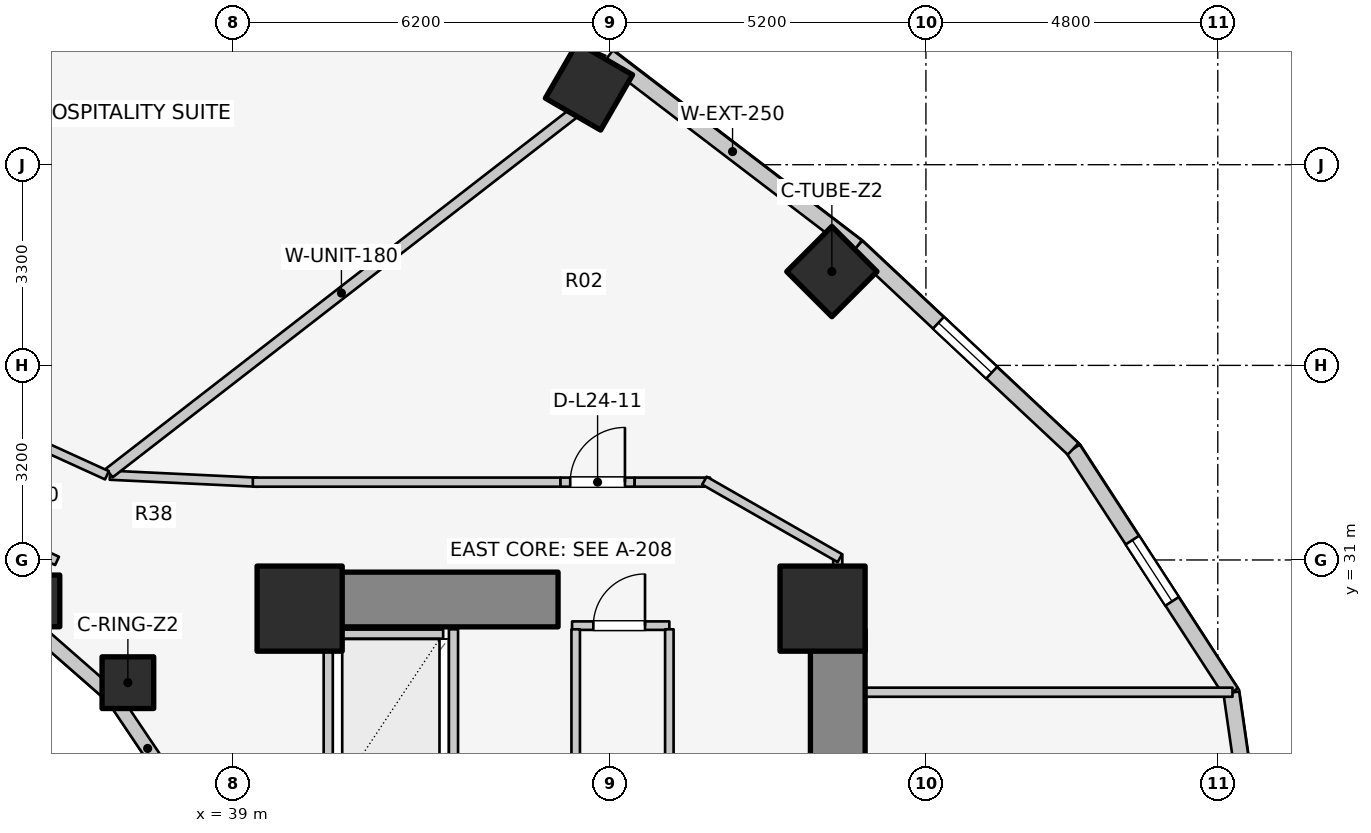
"""IFC4 building model, lengths in metres.
Left out: names, types, materials, properties, quantities, classifications, styles, units other than length and angle.
Written with IfcOpenShell. Run it as: python <this file> out.ifc"""

import sys

from ifc_helpers import new_model, si_unit, direction, frame, frame_2d, origin, origin_2d, place, context, subcontext, project, spatial, rectangle, extrude, element, fill, save


model = new_model("IFC4")
c1 = context("Model", 3, precision=1e-05, world=origin(), true_north=direction((0.0, 1.0)))
c2 = subcontext(c1, "Body", "Model", "MODEL_VIEW")
j1 = project(units=[si_unit("LENGTHUNIT", "METRE"), si_unit("PLANEANGLEUNIT", "RADIAN")], contexts=[c1])
p1 = place(None, origin())
s1 = spatial("IfcSite", under=j1, at=p1, CompositionType="ELEMENT")
p2 = place(p1, origin())
s2 = spatial("IfcBuilding", under=s1, at=p2, CompositionType="ELEMENT")
p3 = place(p2, frame((0.0, 0.0, 82.5)))
s3 = spatial("IfcBuildingStorey", under=s2, at=p3, CompositionType="ELEMENT", Elevation=82.5)
p4 = place(p3, frame((48.95, 17.05, 0.0), z_axis=(0.0, 0.0, 1.0), x_axis=(0.0, 1.0, 0.0)))
e1 = element("IfcWall", 1, at=p4, inside=s3, PredefinedType="SHEAR", context=c2, shape_type="SweptSolid", body=[
    extrude(rectangle(XDim=12.8, YDim=0.9, at=frame_2d((6.4, 0.0))), origin(), (0.0, 0.0, 1.0), 3.1),
])
p5 = place(p3, frame((39.85, 30.35, 0.0), z_axis=(0.0, 0.0, 1.0), x_axis=(1.0, 0.0, 0.0)))
e2 = element("IfcWall", 2, at=p5, inside=s3, PredefinedType="SHEAR", context=c2, shape_type="SweptSolid", body=[
    extrude(rectangle(XDim=4.5, YDim=0.9, at=frame_2d((2.25, 0.0))), origin(), (0.0, 0.0, 1.0), 3.1),
])
for number, where, z_axis, x_axis in (
    (3, (48.7, 30.2, 0.0), (0.0, 0.0, 1.0), (1.0, 0.0, 0.0)),
    (4, (40.1, 30.2, 0.0), (0.0, 0.0, 1.0), (1.0, 0.0, 0.0)),
):
    element("IfcColumn", number, at=place(p3, frame(where, z_axis=z_axis, x_axis=x_axis)), inside=s3, PredefinedType="COLUMN", context=c2, shape_type="SweptSolid", body=[
        extrude(rectangle(XDim=1.4, YDim=1.4, at=origin_2d()), origin(), (0.0, 0.0, 1.0), 3.1),
    ])
p6 = place(p3, frame((37.275, 28.982, 0.0), z_axis=(0.0, 0.0, 1.0), x_axis=(1.0, 0.0, 0.0)))
e5 = element("IfcColumn", 5, at=p6, inside=s3, PredefinedType="COLUMN", context=c2, shape_type="SweptSolid", body=[
    extrude(rectangle(XDim=0.85, YDim=0.85, at=origin_2d()), origin(), (0.0, 0.0, 1.0), 3.1),
])
p7 = place(p3, frame((48.853, 35.743, 0.0), z_axis=(0.0, 0.0, 1.0), x_axis=(0.707106781187, 0.707106781187, 0.0)))
e6 = element("IfcColumn", 6, at=p7, inside=s3, PredefinedType="COLUMN", context=c2, shape_type="SweptSolid", body=[
    extrude(rectangle(XDim=1.05, YDim=1.05, at=origin_2d()), origin(), (0.0, 0.0, 1.0), 3.1),
])
p8 = place(p3, frame((35.73, 30.327, 0.0), z_axis=(0.0, 0.0, 1.0), x_axis=(1.0, 0.0, 0.0)))
e7 = element("IfcColumn", 7, at=p8, inside=s3, PredefinedType="COLUMN", context=c2, shape_type="SweptSolid", body=[
    extrude(rectangle(XDim=0.85, YDim=0.85, at=origin_2d()), origin(), (0.0, 0.0, 1.0), 3.1),
])
p9 = place(p3, frame((44.858, 38.786, 0.0), z_axis=(0.0, 0.0, 1.0), x_axis=(0.5, 0.866025403784, 0.0)))
e8 = element("IfcColumn", 8, at=p9, inside=s3, PredefinedType="COLUMN", context=c2, shape_type="SweptSolid", body=[
    extrude(rectangle(XDim=1.05, YDim=1.05, at=origin_2d()), origin(), (0.0, 0.0, 1.0), 3.1),
])
p10 = place(p3, frame((38.166, 27.06, 0.0), z_axis=(0.0, 0.0, 1.0), x_axis=(-0.558197800898, 0.829707909492, 0.0)))
e9 = element("IfcWall", 9, at=p10, inside=s3, PredefinedType="STANDARD", context=c2, shape_type="SweptSolid", body=[
    extrude(rectangle(XDim=2.027, YDim=0.23, at=frame_2d((1.013, 0.0))), origin(), (0.0, 0.0, 1.0), 1.22),
])
p11 = place(p3, frame((37.035, 28.742, 0.0), z_axis=(0.0, 0.0, 1.0), x_axis=(-0.752576694707, 0.658504607869, 0.0)))
e10 = element("IfcWall", 10, at=p11, inside=s3, PredefinedType="STANDARD", context=c2, shape_type="SweptSolid", body=[
    extrude(rectangle(XDim=1.959, YDim=0.23, at=frame_2d((0.98, 0.0))), origin(), (0.0, 0.0, 1.0), 1.22),
])
p12 = place(p3, frame((56.26, 23.0, 0.0), z_axis=(0.0, 0.0, 1.0), x_axis=(-0.142572472068, 0.98978436551, 0.0)))
e11 = element("IfcWall", 11, at=p12, inside=s3, PredefinedType="STANDARD", context=c2, shape_type="SweptSolid", body=[
    extrude(rectangle(XDim=5.879, YDim=0.26, at=frame_2d((2.939, 0.0))), origin(), (0.0, 0.0, 1.0), 2.57),
])
p13 = place(p12, frame((2.921, 0.0, 0.75)))
e12 = element("IfcOpeningElement", 12, at=p13, cuts=e11, PredefinedType="OPENING", context=c2, shape_type="SweptSolid", body=[
    extrude(rectangle(XDim=1.2, YDim=1.5, at=frame_2d((0.6, 0.75))), frame((0.0, 0.14, 0.0), z_axis=(0.0, -1.0, 0.0), x_axis=(1.0, 0.0, 0.0)), (0.0, 0.0, 1.0), 0.28),
])
p14 = place(p3, frame((55.422, 28.819, 0.0), z_axis=(0.0, 0.0, 1.0), x_axis=(-0.544388392991, 0.838833283541, 0.0)))
e13 = element("IfcWall", 13, at=p14, inside=s3, PredefinedType="STANDARD", context=c2, shape_type="SweptSolid", body=[
    extrude(rectangle(XDim=4.778, YDim=0.26, at=frame_2d((2.389, 0.0))), origin(), (0.0, 0.0, 1.0), 1.22),
])
p15 = place(p14, frame((1.789, 0.0, 0.15)))
e14 = element("IfcOpeningElement", 14, at=p15, cuts=e13, PredefinedType="OPENING", context=c2, shape_type="SweptSolid", body=[
    extrude(rectangle(XDim=1.2, YDim=0.9, at=frame_2d((0.6, 0.45))), frame((0.0, 0.14, 0.0), z_axis=(0.0, -1.0, 0.0), x_axis=(1.0, 0.0, 0.0)), (0.0, 0.0, 1.0), 0.28),
])
p16 = place(p3, frame((52.821, 32.827, 0.0), z_axis=(0.0, 0.0, 1.0), x_axis=(-0.730162452258, 0.68327358599, 0.0)))
e15 = element("IfcWall", 15, at=p16, inside=s3, PredefinedType="STANDARD", context=c2, shape_type="SweptSolid", body=[
    extrude(rectangle(XDim=4.868, YDim=0.26, at=frame_2d((2.434, 0.0))), origin(), (0.0, 0.0, 1.0), 1.22),
])
p17 = place(p16, frame((1.834, 0.0, 0.15)))
e16 = element("IfcOpeningElement", 16, at=p17, cuts=e15, PredefinedType="OPENING", context=c2, shape_type="SweptSolid", body=[
    extrude(rectangle(XDim=1.2, YDim=0.9, at=frame_2d((0.6, 0.45))), frame((0.0, 0.14, 0.0), z_axis=(0.0, -1.0, 0.0), x_axis=(1.0, 0.0, 0.0)), (0.0, 0.0, 1.0), 0.28),
])
p18 = place(p3, frame((49.266, 36.153, 0.0), z_axis=(0.0, 0.0, 1.0), x_axis=(-0.794809810864, 0.606858603427, 0.0)))
e17 = element("IfcWall", 17, at=p18, inside=s3, PredefinedType="STANDARD", context=c2, shape_type="SweptSolid", body=[
    extrude(rectangle(XDim=5.149, YDim=0.26, at=frame_2d((2.575, 0.0))), origin(), (0.0, 0.0, 1.0), 1.22),
])
p19 = place(p3, frame((40.74, 29.78, 0.0), z_axis=(0.0, 0.0, 1.0), x_axis=(1.0, 0.0, 0.0)))
e18 = element("IfcWall", 18, at=p19, inside=s3, PredefinedType="SOLIDWALL", context=c2, shape_type="SweptSolid", body=[
    extrude(rectangle(XDim=1.72, YDim=0.15, at=frame_2d((0.86, 0.0))), origin(), (0.0, 0.0, 1.0), 2.575),
])
for number, where, z_axis, x_axis in (
    (19, (40.57, 27.14, 0.0), (0.0, 0.0, 1.0), (0.0, 1.0, 0.0)),
    (20, (42.63, 27.14, 0.0), (0.0, 0.0, 1.0), (0.0, 1.0, 0.0)),
):
    element("IfcWall", number, at=place(p3, frame(where, z_axis=z_axis, x_axis=x_axis)), inside=s3, PredefinedType="SOLIDWALL", context=c2, shape_type="SweptSolid", body=[
        extrude(rectangle(XDim=2.72, YDim=0.15, at=frame_2d((1.36, 0.0))), origin(), (0.0, 0.0, 1.0), 2.575),
    ])
p20 = place(p3, frame((44.58, 29.92, 0.0), z_axis=(0.0, 0.0, 1.0), x_axis=(1.0, 0.0, 0.0)))
e21 = element("IfcWall", 21, at=p20, inside=s3, PredefinedType="PLUMBINGWALL", context=c2, shape_type="SweptSolid", body=[
    extrude(rectangle(XDim=1.6, YDim=0.14, at=frame_2d((0.8, 0.0))), origin(), (0.0, 0.0, 1.0), 2.575),
])
p21 = place(p20, frame((0.35, 0.0, 0.0)))
e22 = element("IfcOpeningElement", 22, at=p21, cuts=e21, PredefinedType="OPENING", context=c2, shape_type="SweptSolid", body=[
    extrude(rectangle(XDim=0.85, YDim=2.05, at=frame_2d((0.425, 1.025))), frame((0.0, 0.08, 0.0), z_axis=(0.0, -1.0, 0.0), x_axis=(1.0, 0.0, 0.0)), (0.0, 0.0, 1.0), 0.16),
])
for number, where, z_axis, x_axis in (
    (23, (44.64, 25.98, 0.0), (0.0, 0.0, 1.0), (0.0, 1.0, 0.0)),
    (24, (46.18, 25.98, 0.0), (0.0, 0.0, 1.0), (0.0, 1.0, 0.0)),
):
    element("IfcWall", number, at=place(p3, frame(where, z_axis=z_axis, x_axis=x_axis)), inside=s3, PredefinedType="PLUMBINGWALL", context=c2, shape_type="SweptSolid", body=[
        extrude(rectangle(XDim=3.88, YDim=0.14, at=frame_2d((1.94, 0.0))), origin(), (0.0, 0.0, 1.0), 2.575),
    ])
p22 = place(p3, frame((36.11, 30.985, 0.0), z_axis=(0.0, 0.0, 1.0), x_axis=(-0.906943449489, 0.421252393975, 0.0)))
e25 = element("IfcWall", 25, at=p22, inside=s3, PredefinedType="PARTITIONING", context=c2, shape_type="SweptSolid", body=[
    extrude(rectangle(XDim=2.186, YDim=0.15, at=frame_2d((1.093, 0.0))), origin(), (0.0, 0.0, 1.0), 1.22),
])
p23 = place(p3, frame((48.95, 28.825, 0.0), z_axis=(0.0, 0.0, 1.0), x_axis=(1.0, 0.0, 0.0)))
e26 = element("IfcWall", 26, at=p23, inside=s3, PredefinedType="PARTITIONING", context=c2, shape_type="SweptSolid", body=[
    extrude(rectangle(XDim=6.492, YDim=0.15, at=frame_2d((3.246, 0.0))), origin(), (0.0, 0.0, 1.0), 2.575),
])
p24 = place(p3, frame((48.95, 29.8, 0.0), z_axis=(0.0, 0.0, 1.0), x_axis=(0.0, 1.0, 0.0)))
e27 = element("IfcWall", 27, at=p24, inside=s3, PredefinedType="PARTITIONING", context=c2, shape_type="SweptSolid", body=[
    extrude(rectangle(XDim=1.29, YDim=0.15, at=frame_2d((0.645, 0.0))), origin(), (0.0, 0.0, 1.0), 1.22),
])
p25 = place(p3, frame((36.98, 32.394, 0.0), z_axis=(0.0, 0.0, 1.0), x_axis=(0.998877427952, -0.047369651964, 0.0)))
e28 = element("IfcWall", 28, at=p25, inside=s3, PredefinedType="PARTITIONING", context=c2, shape_type="SweptSolid", body=[
    extrude(rectangle(XDim=2.433, YDim=0.15, at=frame_2d((1.216, 0.0))), origin(), (0.0, 0.0, 1.0), 1.22),
])
p26 = place(p3, frame((39.33, 32.28, 0.0), z_axis=(0.0, 0.0, 1.0), x_axis=(1.0, 0.0, 0.0)))
e29 = element("IfcWall", 29, at=p26, inside=s3, PredefinedType="PARTITIONING", context=c2, shape_type="SweptSolid", body=[
    extrude(rectangle(XDim=5.06, YDim=0.15, at=frame_2d((2.53, 0.0))), origin(), (0.0, 0.0, 1.0), 1.22),
])
p27 = place(p3, frame((44.39, 32.28, 0.0), z_axis=(0.0, 0.0, 1.0), x_axis=(1.0, 0.0, 0.0)))
e30 = element("IfcWall", 30, at=p27, inside=s3, PredefinedType="PARTITIONING", context=c2, shape_type="SweptSolid", body=[
    extrude(rectangle(XDim=1.22, YDim=0.15, at=frame_2d((0.61, 0.0))), origin(), (0.0, 0.0, 1.0), 2.575),
])
p28 = place(p27, frame((0.16, 0.0, 0.0)))
e31 = element("IfcOpeningElement", 31, at=p28, cuts=e30, PredefinedType="OPENING", context=c2, shape_type="SweptSolid", body=[
    extrude(rectangle(XDim=0.9, YDim=2.1, at=frame_2d((0.45, 1.05))), frame((0.0, 0.085, 0.0), z_axis=(0.0, -1.0, 0.0), x_axis=(1.0, 0.0, 0.0)), (0.0, 0.0, 1.0), 0.17),
])
p29 = place(p3, frame((45.61, 32.28, 0.0), z_axis=(0.0, 0.0, 1.0), x_axis=(1.0, 0.0, 0.0)))
e32 = element("IfcWall", 32, at=p29, inside=s3, PredefinedType="PARTITIONING", context=c2, shape_type="SweptSolid", body=[
    extrude(rectangle(XDim=1.24, YDim=0.15, at=frame_2d((0.62, 0.0))), origin(), (0.0, 0.0, 1.0), 2.575),
])
p30 = place(p3, frame((46.757, 32.305, 0.0), z_axis=(0.0, 0.0, 1.0), x_axis=(0.867991349648, -0.496579315857, 0.0)))
e33 = element("IfcWall", 33, at=p30, inside=s3, PredefinedType="PARTITIONING", context=c2, shape_type="SweptSolid", body=[
    extrude(rectangle(XDim=2.567, YDim=0.15, at=frame_2d((1.283, 0.0))), origin(), (0.0, 0.0, 1.0), 1.22),
])
p31 = place(p3, frame((36.969, 32.43, 0.0), z_axis=(0.0, 0.0, 1.0), x_axis=(0.790421780952, 0.612562983045, 0.0)))
e34 = element("IfcWall", 34, at=p31, inside=s3, PredefinedType="PARTITIONING", context=c2, shape_type="SweptSolid", body=[
    extrude(rectangle(XDim=9.662, YDim=0.18, at=frame_2d((4.831, 0.0))), origin(), (0.0, 0.0, 1.0), 1.22),
])
p32 = place(p3, frame((36.931, 32.393, 0.0), z_axis=(0.0, 0.0, 1.0), x_axis=(-0.909747571199, 0.415161843982, 0.0)))
e35 = element("IfcWall", 35, at=p32, inside=s3, PredefinedType="PARTITIONING", context=c2, shape_type="SweptSolid", body=[
    extrude(rectangle(XDim=2.625, YDim=0.15, at=frame_2d((1.312, 0.0))), origin(), (0.0, 0.0, 1.0), 1.22),
])
p33 = place(p15, origin())
e36 = element("IfcWindow", 36, at=p33, inside=s3, PartitioningType="SINGLE_PANEL", PredefinedType="WINDOW", context=c2, shape_type="SweptSolid", body=[
    extrude(rectangle(XDim=1.2, YDim=0.9, at=frame_2d((0.6, 0.45))), frame((0.0, 0.03, 0.0), z_axis=(0.0, -1.0, 0.0), x_axis=(1.0, 0.0, 0.0)), (0.0, 0.0, 1.0), 0.06),
])
fill(e14, e36)
p34 = place(p17, origin())
e37 = element("IfcWindow", 37, at=p34, inside=s3, PartitioningType="SINGLE_PANEL", PredefinedType="WINDOW", context=c2, shape_type="SweptSolid", body=[
    extrude(rectangle(XDim=1.2, YDim=0.9, at=frame_2d((0.6, 0.45))), frame((0.0, 0.03, 0.0), z_axis=(0.0, -1.0, 0.0), x_axis=(1.0, 0.0, 0.0)), (0.0, 0.0, 1.0), 0.06),
])
fill(e16, e37)
p35 = place(p21, origin())
e38 = element("IfcDoor", 38, at=p35, inside=s3, OperationType="SINGLE_SWING_RIGHT", PredefinedType="DOOR", context=c2, shape_type="SweptSolid", body=[
    extrude(rectangle(XDim=0.85, YDim=2.05, at=frame_2d((0.425, 1.025))), frame((0.0, 0.025, 0.0), z_axis=(0.0, -1.0, 0.0), x_axis=(1.0, 0.0, 0.0)), (0.0, 0.0, 1.0), 0.05),
])
fill(e22, e38)
p36 = place(p28, origin())
e39 = element("IfcDoor", 39, at=p36, inside=s3, OperationType="SINGLE_SWING_RIGHT", PredefinedType="DOOR", context=c2, shape_type="SweptSolid", body=[
    extrude(rectangle(XDim=0.9, YDim=2.1, at=frame_2d((0.45, 1.05))), frame((0.0, 0.025, 0.0), z_axis=(0.0, -1.0, 0.0), x_axis=(1.0, 0.0, 0.0)), (0.0, 0.0, 1.0), 0.05),
])
fill(e31, e39)
save(model, sys.argv[1])
